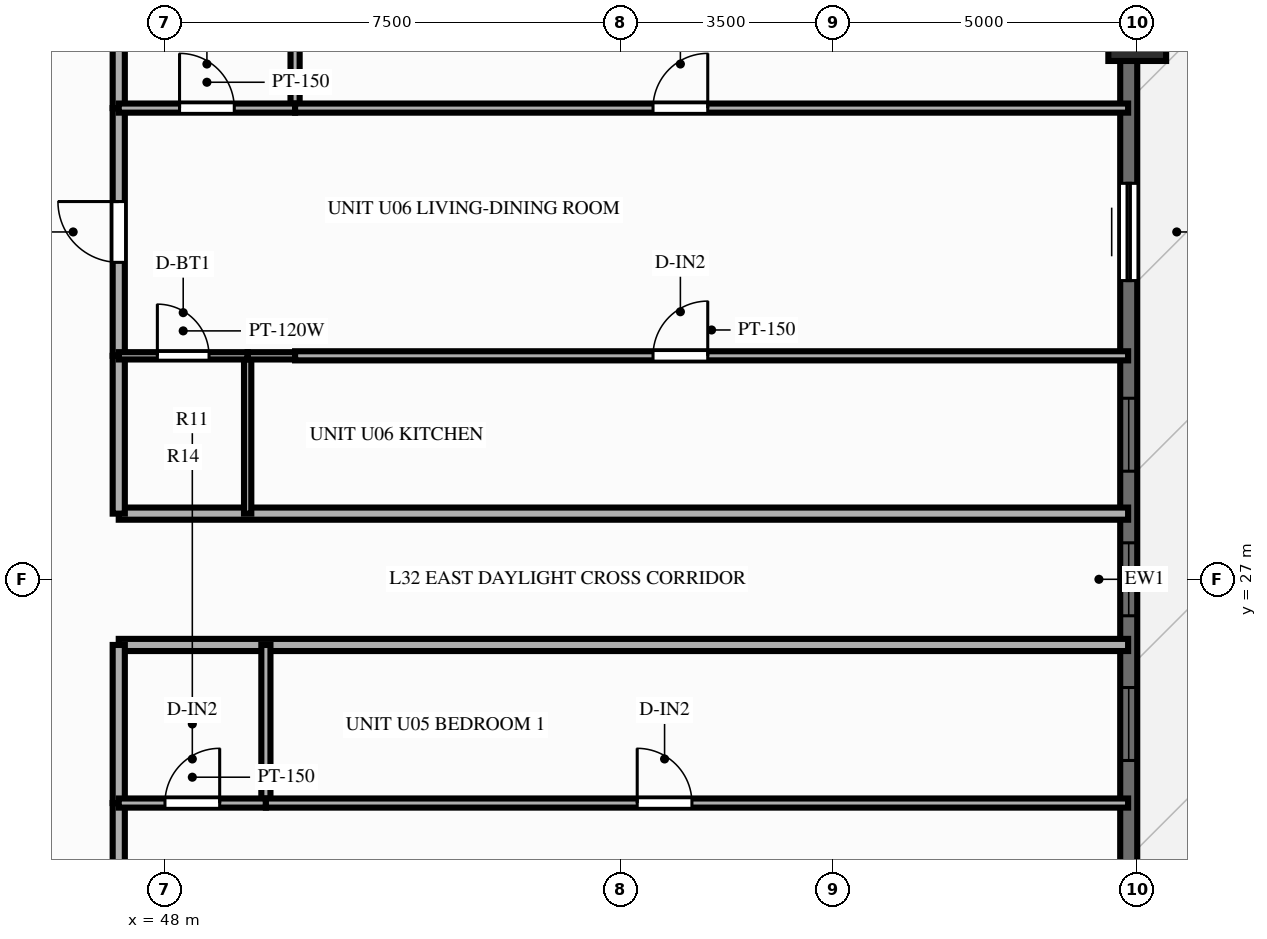
"""IFC4 building model, lengths in metres.
Left out: names, types, materials, properties, quantities, classifications, styles, units other than length and angle.
Written with IfcOpenShell. Run it as: python <this file> out.ifc"""

import sys

from ifc_helpers import new_model, si_unit, direction, frame, frame_2d, origin, origin_2d, place, context, subcontext, project, spatial, rectangle, extrude, source, transform, mapped, element, fill, save


model = new_model("IFC4")
c1 = context("Model", 3, precision=1e-05, world=origin(), true_north=direction((0.0, 1.0)))
c2 = subcontext(c1, "Body", "Model", "MODEL_VIEW")
j1 = project(units=[si_unit("LENGTHUNIT", "METRE"), si_unit("PLANEANGLEUNIT", "RADIAN")], contexts=[c1])
p1 = place(None, origin())
s1 = spatial("IfcSite", under=j1, at=p1, CompositionType="ELEMENT")
p2 = place(p1, origin())
s2 = spatial("IfcBuilding", under=s1, at=p2, CompositionType="ELEMENT")
p3 = place(p2, frame((0.0, 0.0, 101.85)))
s3 = spatial("IfcBuildingStorey", under=s2, at=p3, CompositionType="ELEMENT", Elevation=101.85)
m1 = source(origin(), c2, "Body", "SweptSolid", [
    extrude(rectangle(XDim=0.95, YDim=0.95, at=origin_2d()), origin(), (0.0, 0.0, 1.0), 3.0),
])
p4 = place(p3, frame((64.0, 36.0, 0.0), z_axis=(0.0, 0.0, 1.0), x_axis=(1.0, 0.0, 0.0)))
e1 = element("IfcColumn", 1, at=p4, inside=s3, PredefinedType="COLUMN", context=c2, shape_type="MappedRepresentation", body=[
    mapped(m1, transform((0.0, 0.0, 0.0), scale=1.0)),
])
p5 = place(p3, frame((63.86, 7.2, 0.0), z_axis=(0.0, 0.0, 1.0), x_axis=(0.0, 1.0, 0.0)))
e2 = element("IfcWall", 2, at=p5, inside=s3, PredefinedType="SOLIDWALL", context=c2, shape_type="SweptSolid", body=[
    extrude(rectangle(XDim=39.6, YDim=0.28, at=frame_2d((19.8, 0.0))), origin(), (0.0, 0.0, 1.0), 2.28),
])
p6 = place(p5, frame((0.945, 0.0, 0.25)))
e3 = element("IfcOpeningElement", 3, at=p6, cuts=e2, PredefinedType="OPENING", context=c2, shape_type="SweptSolid", body=[
    extrude(rectangle(XDim=1.2, YDim=1.5, at=frame_2d((0.6, 0.75))), frame((0.0, 0.152, 0.0), z_axis=(0.0, -1.0, 0.0), x_axis=(1.0, 0.0, 0.0)), (0.0, 0.0, 1.0), 0.304),
])
p7 = place(p5, frame((4.213, 0.0, 0.25)))
e4 = element("IfcOpeningElement", 4, at=p7, cuts=e2, PredefinedType="OPENING", context=c2, shape_type="SweptSolid", body=[
    extrude(rectangle(XDim=1.2, YDim=1.5, at=frame_2d((0.6, 0.75))), frame((0.0, 0.152, 0.0), z_axis=(0.0, -1.0, 0.0), x_axis=(1.0, 0.0, 0.0)), (0.0, 0.0, 1.0), 0.304),
])
p8 = place(p5, frame((7.55, 0.0, 0.25)))
e5 = element("IfcOpeningElement", 5, at=p8, cuts=e2, PredefinedType="OPENING", context=c2, shape_type="SweptSolid", body=[
    extrude(rectangle(XDim=1.2, YDim=1.5, at=frame_2d((0.6, 0.75))), frame((0.0, 0.152, 0.0), z_axis=(0.0, -1.0, 0.0), x_axis=(1.0, 0.0, 0.0)), (0.0, 0.0, 1.0), 0.304),
])
p9 = place(p5, frame((13.483, 0.0, 0.25)))
e6 = element("IfcOpeningElement", 6, at=p9, cuts=e2, PredefinedType="OPENING", context=c2, shape_type="SweptSolid", body=[
    extrude(rectangle(XDim=1.2, YDim=1.5, at=frame_2d((0.6, 0.75))), frame((0.0, 0.152, 0.0), z_axis=(0.0, -1.0, 0.0), x_axis=(1.0, 0.0, 0.0)), (0.0, 0.0, 1.0), 0.304),
])
p10 = place(p5, frame((16.82, 0.0, 0.25)))
e7 = element("IfcOpeningElement", 7, at=p10, cuts=e2, PredefinedType="OPENING", context=c2, shape_type="SweptSolid", body=[
    extrude(rectangle(XDim=1.2, YDim=1.5, at=frame_2d((0.6, 0.75))), frame((0.0, 0.152, 0.0), z_axis=(0.0, -1.0, 0.0), x_axis=(1.0, 0.0, 0.0)), (0.0, 0.0, 1.0), 0.304),
])
p11 = place(p5, frame((19.2, 0.0, 0.25)))
e8 = element("IfcOpeningElement", 8, at=p11, cuts=e2, PredefinedType="OPENING", context=c2, shape_type="SweptSolid", body=[
    extrude(rectangle(XDim=1.2, YDim=1.5, at=frame_2d((0.6, 0.75))), frame((0.0, 0.152, 0.0), z_axis=(0.0, -1.0, 0.0), x_axis=(1.0, 0.0, 0.0)), (0.0, 0.0, 1.0), 0.304),
])
p12 = place(p5, frame((21.578, 0.0, 0.25)))
e9 = element("IfcOpeningElement", 9, at=p12, cuts=e2, PredefinedType="OPENING", context=c2, shape_type="SweptSolid", body=[
    extrude(rectangle(XDim=1.2, YDim=1.5, at=frame_2d((0.6, 0.75))), frame((0.0, 0.152, 0.0), z_axis=(0.0, -1.0, 0.0), x_axis=(1.0, 0.0, 0.0)), (0.0, 0.0, 1.0), 0.304),
])
p13 = place(p5, frame((26.313, 0.0, 0.0), z_axis=(0.0, 0.0, 1.0), x_axis=(-1.0, 0.0, 0.0)))
e10 = element("IfcOpeningElement", 10, at=p13, cuts=e2, PredefinedType="OPENING", context=c2, shape_type="SweptSolid", body=[
    extrude(rectangle(XDim=1.6, YDim=2.15, at=frame_2d((0.8, 1.075))), frame((0.0, 0.152, 0.0), z_axis=(0.0, -1.0, 0.0), x_axis=(1.0, 0.0, 0.0)), (0.0, 0.0, 1.0), 0.304),
])
p14 = place(p5, frame((29.305, 0.0, 0.25)))
e11 = element("IfcOpeningElement", 11, at=p14, cuts=e2, PredefinedType="OPENING", context=c2, shape_type="SweptSolid", body=[
    extrude(rectangle(XDim=0.7, YDim=1.5, at=frame_2d((0.35, 0.75))), frame((0.0, 0.152, 0.0), z_axis=(0.0, -1.0, 0.0), x_axis=(1.0, 0.0, 0.0)), (0.0, 0.0, 1.0), 0.304),
])
p15 = place(p5, frame((30.848, 0.0, 0.25)))
e12 = element("IfcOpeningElement", 12, at=p15, cuts=e2, PredefinedType="OPENING", context=c2, shape_type="SweptSolid", body=[
    extrude(rectangle(XDim=1.2, YDim=1.5, at=frame_2d((0.6, 0.75))), frame((0.0, 0.152, 0.0), z_axis=(0.0, -1.0, 0.0), x_axis=(1.0, 0.0, 0.0)), (0.0, 0.0, 1.0), 0.304),
])
p16 = place(p5, frame((34.183, 0.0, 0.25)))
e13 = element("IfcOpeningElement", 13, at=p16, cuts=e2, PredefinedType="OPENING", context=c2, shape_type="SweptSolid", body=[
    extrude(rectangle(XDim=1.2, YDim=1.5, at=frame_2d((0.6, 0.75))), frame((0.0, 0.152, 0.0), z_axis=(0.0, -1.0, 0.0), x_axis=(1.0, 0.0, 0.0)), (0.0, 0.0, 1.0), 0.304),
])
p17 = place(p5, frame((37.452, 0.0, 0.25)))
e14 = element("IfcOpeningElement", 14, at=p17, cuts=e2, PredefinedType="OPENING", context=c2, shape_type="SweptSolid", body=[
    extrude(rectangle(XDim=1.2, YDim=1.5, at=frame_2d((0.6, 0.75))), frame((0.0, 0.152, 0.0), z_axis=(0.0, -1.0, 0.0), x_axis=(1.0, 0.0, 0.0)), (0.0, 0.0, 1.0), 0.304),
])
p18 = place(p3, frame((47.25, 25.92, 0.0), z_axis=(0.0, 0.0, 1.0), x_axis=(1.0, 0.0, 0.0)))
e15 = element("IfcWall", 15, at=p18, inside=s3, PredefinedType="PARTITIONING", context=c2, shape_type="SweptSolid", body=[
    extrude(rectangle(XDim=16.6, YDim=0.2, at=frame_2d((8.3, 0.0))), origin(), (0.0, 0.0, 1.0), 2.79),
])
p19 = place(p3, frame((47.25, 19.246, 0.0), z_axis=(0.0, 0.0, 1.0), x_axis=(0.0, 1.0, 0.0)))
e16 = element("IfcWall", 16, at=p19, inside=s3, PredefinedType="PARTITIONING", context=c2, shape_type="SweptSolid", body=[
    extrude(rectangle(XDim=4.074, YDim=0.2, at=frame_2d((2.037, 0.0))), origin(), (0.0, 0.0, 1.0), 2.79),
])
p20 = place(p19, frame((1.537, 0.0, 0.0)))
e17 = element("IfcOpeningElement", 17, at=p20, cuts=e16, PredefinedType="OPENING", context=c2, shape_type="SweptSolid", body=[
    extrude(rectangle(XDim=1.0, YDim=2.15, at=frame_2d((0.5, 1.075))), frame((0.0, 0.112, 0.0), z_axis=(0.0, -1.0, 0.0), x_axis=(1.0, 0.0, 0.0)), (0.0, 0.0, 1.0), 0.224),
])
p21 = place(p3, frame((47.25, 23.32, 0.0), z_axis=(0.0, 0.0, 1.0), x_axis=(0.0, 1.0, 0.0)))
e18 = element("IfcWall", 18, at=p21, inside=s3, PredefinedType="PARTITIONING", context=c2, shape_type="SweptSolid", body=[
    extrude(rectangle(XDim=2.6, YDim=0.2, at=frame_2d((1.3, 0.0))), origin(), (0.0, 0.0, 1.0), 2.79),
])
p22 = place(p3, frame((49.67, 23.32, 0.0), z_axis=(0.0, 0.0, 1.0), x_axis=(0.0, 1.0, 0.0)))
e19 = element("IfcWall", 19, at=p22, inside=s3, PredefinedType="PARTITIONING", context=c2, shape_type="SweptSolid", body=[
    extrude(rectangle(XDim=2.6, YDim=0.15, at=frame_2d((1.3, 0.0))), origin(), (0.0, 0.0, 1.0), 2.79),
])
p23 = place(p3, frame((47.25, 23.32, 0.0), z_axis=(0.0, 0.0, 1.0), x_axis=(1.0, 0.0, 0.0)))
e20 = element("IfcWall", 20, at=p23, inside=s3, PredefinedType="PARTITIONING", context=c2, shape_type="SweptSolid", body=[
    extrude(rectangle(XDim=2.42, YDim=0.15, at=frame_2d((1.21, 0.0))), origin(), (0.0, 0.0, 1.0), 2.79),
])
p24 = place(p23, frame((0.76, 0.0, 0.0)))
e21 = element("IfcOpeningElement", 21, at=p24, cuts=e20, PredefinedType="OPENING", context=c2, shape_type="SweptSolid", body=[
    extrude(rectangle(XDim=0.9, YDim=2.1, at=frame_2d((0.45, 1.05))), frame((0.0, 0.087, 0.0), z_axis=(0.0, -1.0, 0.0), x_axis=(1.0, 0.0, 0.0)), (0.0, 0.0, 1.0), 0.174),
])
p25 = place(p3, frame((49.67, 23.32, 0.0), z_axis=(0.0, 0.0, 1.0), x_axis=(1.0, 0.0, 0.0)))
e22 = element("IfcWall", 22, at=p25, inside=s3, PredefinedType="PARTITIONING", context=c2, shape_type="SweptSolid", body=[
    extrude(rectangle(XDim=14.18, YDim=0.15, at=frame_2d((7.09, 0.0))), origin(), (0.0, 0.0, 1.0), 2.79),
])
p26 = place(p25, frame((6.107, 0.0, 0.0)))
e23 = element("IfcOpeningElement", 23, at=p26, cuts=e22, PredefinedType="OPENING", context=c2, shape_type="SweptSolid", body=[
    extrude(rectangle(XDim=0.9, YDim=2.1, at=frame_2d((0.45, 1.05))), frame((0.0, 0.087, 0.0), z_axis=(0.0, -1.0, 0.0), x_axis=(1.0, 0.0, 0.0)), (0.0, 0.0, 1.0), 0.174),
])
p27 = place(p3, frame((47.25, 28.08, 0.0), z_axis=(0.0, 0.0, 1.0), x_axis=(1.0, 0.0, 0.0)))
e24 = element("IfcWall", 24, at=p27, inside=s3, PredefinedType="PARTITIONING", context=c2, shape_type="SweptSolid", body=[
    extrude(rectangle(XDim=16.6, YDim=0.2, at=frame_2d((8.3, 0.0))), origin(), (0.0, 0.0, 1.0), 2.79),
])
p28 = place(p3, frame((47.25, 28.08, 0.0), z_axis=(0.0, 0.0, 1.0), x_axis=(0.0, 1.0, 0.0)))
e25 = element("IfcWall", 25, at=p28, inside=s3, PredefinedType="PARTITIONING", context=c2, shape_type="SweptSolid", body=[
    extrude(rectangle(XDim=2.595, YDim=0.2, at=frame_2d((1.298, 0.0))), origin(), (0.0, 0.0, 1.0), 2.79),
])
p29 = place(p3, frame((47.25, 30.676, 0.0), z_axis=(0.0, 0.0, 1.0), x_axis=(0.0, 1.0, 0.0)))
e26 = element("IfcWall", 26, at=p29, inside=s3, PredefinedType="PARTITIONING", context=c2, shape_type="SweptSolid", body=[
    extrude(rectangle(XDim=4.074, YDim=0.2, at=frame_2d((2.037, 0.0))), origin(), (0.0, 0.0, 1.0), 2.79),
])
p30 = place(p29, frame((1.537, 0.0, 0.0)))
e27 = element("IfcOpeningElement", 27, at=p30, cuts=e26, PredefinedType="OPENING", context=c2, shape_type="SweptSolid", body=[
    extrude(rectangle(XDim=1.0, YDim=2.15, at=frame_2d((0.5, 1.075))), frame((0.0, 0.112, 0.0), z_axis=(0.0, -1.0, 0.0), x_axis=(1.0, 0.0, 0.0)), (0.0, 0.0, 1.0), 0.224),
])
p31 = place(p3, frame((47.25, 34.75, 0.0), z_axis=(0.0, 0.0, 1.0), x_axis=(0.0, 1.0, 0.0)))
e28 = element("IfcWall", 28, at=p31, inside=s3, PredefinedType="PARTITIONING", context=c2, shape_type="SweptSolid", body=[
    extrude(rectangle(XDim=2.6, YDim=0.2, at=frame_2d((1.3, 0.0))), origin(), (0.0, 0.0, 1.0), 2.79),
])
p32 = place(p3, frame((49.37, 28.08, 0.0), z_axis=(0.0, 0.0, 1.0), x_axis=(0.0, 1.0, 0.0)))
e29 = element("IfcWall", 29, at=p32, inside=s3, PredefinedType="PARTITIONING", context=c2, shape_type="SweptSolid", body=[
    extrude(rectangle(XDim=2.595, YDim=0.12, at=frame_2d((1.298, 0.0))), origin(), (0.0, 0.0, 1.0), 2.79),
])
p33 = place(p3, frame((50.15, 34.75, 0.0), z_axis=(0.0, 0.0, 1.0), x_axis=(0.0, 1.0, 0.0)))
e30 = element("IfcWall", 30, at=p33, inside=s3, PredefinedType="PARTITIONING", context=c2, shape_type="SweptSolid", body=[
    extrude(rectangle(XDim=2.6, YDim=0.15, at=frame_2d((1.3, 0.0))), origin(), (0.0, 0.0, 1.0), 2.79),
])
p34 = place(p3, frame((47.25, 30.676, 0.0), z_axis=(0.0, 0.0, 1.0), x_axis=(1.0, 0.0, 0.0)))
e31 = element("IfcWall", 31, at=p34, inside=s3, PredefinedType="PARTITIONING", context=c2, shape_type="SweptSolid", body=[
    extrude(rectangle(XDim=2.12, YDim=0.12, at=frame_2d((1.06, 0.0))), origin(), (0.0, 0.0, 1.0), 2.79),
])
p35 = place(p34, frame((0.635, 0.0, 0.0)))
e32 = element("IfcOpeningElement", 32, at=p35, cuts=e31, PredefinedType="OPENING", context=c2, shape_type="SweptSolid", body=[
    extrude(rectangle(XDim=0.85, YDim=2.05, at=frame_2d((0.425, 1.025))), frame((0.0, 0.072, 0.0), z_axis=(0.0, -1.0, 0.0), x_axis=(1.0, 0.0, 0.0)), (0.0, 0.0, 1.0), 0.144),
])
p36 = place(p3, frame((49.37, 30.676, 0.0), z_axis=(0.0, 0.0, 1.0), x_axis=(1.0, 0.0, 0.0)))
e33 = element("IfcWall", 33, at=p36, inside=s3, PredefinedType="PARTITIONING", context=c2, shape_type="SweptSolid", body=[
    extrude(rectangle(XDim=0.78, YDim=0.12, at=frame_2d((0.39, 0.0))), origin(), (0.0, 0.0, 1.0), 2.79),
])
p37 = place(p3, frame((50.15, 30.676, 0.0), z_axis=(0.0, 0.0, 1.0), x_axis=(1.0, 0.0, 0.0)))
e34 = element("IfcWall", 34, at=p37, inside=s3, PredefinedType="PARTITIONING", context=c2, shape_type="SweptSolid", body=[
    extrude(rectangle(XDim=13.7, YDim=0.15, at=frame_2d((6.85, 0.0))), origin(), (0.0, 0.0, 1.0), 2.79),
])
p38 = place(p37, frame((5.887, 0.0, 0.0)))
e35 = element("IfcOpeningElement", 35, at=p38, cuts=e34, PredefinedType="OPENING", context=c2, shape_type="SweptSolid", body=[
    extrude(rectangle(XDim=0.9, YDim=2.1, at=frame_2d((0.45, 1.05))), frame((0.0, 0.087, 0.0), z_axis=(0.0, -1.0, 0.0), x_axis=(1.0, 0.0, 0.0)), (0.0, 0.0, 1.0), 0.174),
])
p39 = place(p3, frame((47.25, 34.75, 0.0), z_axis=(0.0, 0.0, 1.0), x_axis=(1.0, 0.0, 0.0)))
e36 = element("IfcWall", 36, at=p39, inside=s3, PredefinedType="PARTITIONING", context=c2, shape_type="SweptSolid", body=[
    extrude(rectangle(XDim=2.9, YDim=0.15, at=frame_2d((1.45, 0.0))), origin(), (0.0, 0.0, 1.0), 2.79),
])
p40 = place(p39, frame((1.0, 0.0, 0.0)))
e37 = element("IfcOpeningElement", 37, at=p40, cuts=e36, PredefinedType="OPENING", context=c2, shape_type="SweptSolid", body=[
    extrude(rectangle(XDim=0.9, YDim=2.1, at=frame_2d((0.45, 1.05))), frame((0.0, 0.087, 0.0), z_axis=(0.0, -1.0, 0.0), x_axis=(1.0, 0.0, 0.0)), (0.0, 0.0, 1.0), 0.174),
])
p41 = place(p3, frame((50.15, 34.75, 0.0), z_axis=(0.0, 0.0, 1.0), x_axis=(1.0, 0.0, 0.0)))
e38 = element("IfcWall", 38, at=p41, inside=s3, PredefinedType="PARTITIONING", context=c2, shape_type="SweptSolid", body=[
    extrude(rectangle(XDim=13.7, YDim=0.15, at=frame_2d((6.85, 0.0))), origin(), (0.0, 0.0, 1.0), 2.79),
])
p42 = place(p41, frame((5.887, 0.0, 0.0)))
e39 = element("IfcOpeningElement", 39, at=p42, cuts=e38, PredefinedType="OPENING", context=c2, shape_type="SweptSolid", body=[
    extrude(rectangle(XDim=0.9, YDim=2.1, at=frame_2d((0.45, 1.05))), frame((0.0, 0.087, 0.0), z_axis=(0.0, -1.0, 0.0), x_axis=(1.0, 0.0, 0.0)), (0.0, 0.0, 1.0), 0.174),
])
m2 = source(origin(), c2, "Body", "SweptSolid", [
    extrude(rectangle(XDim=1.2, YDim=1.5, at=frame_2d((0.6, 0.75))), frame((0.0, 0.03, 0.0), z_axis=(0.0, -1.0, 0.0), x_axis=(1.0, 0.0, 0.0)), (0.0, 0.0, 1.0), 0.06),
])
p43 = place(p10, origin())
e40 = element("IfcWindow", 40, at=p43, inside=s3, PartitioningType="SINGLE_PANEL", PredefinedType="WINDOW", context=c2, shape_type="MappedRepresentation", body=[
    mapped(m2, transform((0.0, 0.0, 0.0), scale=1.0)),
])
fill(e7, e40)
p44 = place(p11, origin())
e41 = element("IfcWindow", 41, at=p44, inside=s3, PartitioningType="SINGLE_PANEL", PredefinedType="WINDOW", context=c2, shape_type="MappedRepresentation", body=[
    mapped(m2, transform((0.0, 0.0, 0.0), scale=1.0)),
])
fill(e8, e41)
p45 = place(p12, origin())
e42 = element("IfcWindow", 42, at=p45, inside=s3, PartitioningType="SINGLE_PANEL", PredefinedType="WINDOW", context=c2, shape_type="MappedRepresentation", body=[
    mapped(m2, transform((0.0, 0.0, 0.0), scale=1.0)),
])
fill(e9, e42)
m3 = source(origin(), c2, "Body", "SweptSolid", [
    extrude(rectangle(XDim=1.6, YDim=2.15, at=frame_2d((0.8, 1.075))), frame((0.0, 0.025, 0.0), z_axis=(0.0, -1.0, 0.0), x_axis=(1.0, 0.0, 0.0)), (0.0, 0.0, 1.0), 0.05),
])
p46 = place(p13, origin())
e43 = element("IfcDoor", 43, at=p46, inside=s3, OperationType="SLIDING_TO_LEFT", PredefinedType="DOOR", context=c2, shape_type="MappedRepresentation", body=[
    mapped(m3, transform((0.0, 0.0, 0.0), scale=1.0)),
])
fill(e10, e43)
m4 = source(origin(), c2, "Body", "SweptSolid", [
    extrude(rectangle(XDim=0.9, YDim=2.1, at=frame_2d((0.45, 1.05))), frame((0.0, 0.025, 0.0), z_axis=(0.0, -1.0, 0.0), x_axis=(1.0, 0.0, 0.0)), (0.0, 0.0, 1.0), 0.05),
])
p47 = place(p24, origin())
e44 = element("IfcDoor", 44, at=p47, inside=s3, OperationType="SINGLE_SWING_RIGHT", PredefinedType="DOOR", context=c2, shape_type="MappedRepresentation", body=[
    mapped(m4, transform((0.0, 0.0, 0.0), scale=1.0)),
])
fill(e21, e44)
p48 = place(p26, origin())
e45 = element("IfcDoor", 45, at=p48, inside=s3, OperationType="SINGLE_SWING_LEFT", PredefinedType="DOOR", context=c2, shape_type="MappedRepresentation", body=[
    mapped(m4, transform((0.0, 0.0, 0.0), scale=1.0)),
])
fill(e23, e45)
m5 = source(origin(), c2, "Body", "SweptSolid", [
    extrude(rectangle(XDim=1.0, YDim=2.15, at=frame_2d((0.5, 1.075))), frame((0.0, 0.025, 0.0), z_axis=(0.0, -1.0, 0.0), x_axis=(1.0, 0.0, 0.0)), (0.0, 0.0, 1.0), 0.05),
])
p49 = place(p30, origin())
e46 = element("IfcDoor", 46, at=p49, inside=s3, OperationType="SINGLE_SWING_RIGHT", PredefinedType="DOOR", context=c2, shape_type="MappedRepresentation", body=[
    mapped(m5, transform((0.0, 0.0, 0.0), scale=1.0)),
])
fill(e27, e46)
m6 = source(origin(), c2, "Body", "SweptSolid", [
    extrude(rectangle(XDim=0.85, YDim=2.05, at=frame_2d((0.425, 1.025))), frame((0.0, 0.025, 0.0), z_axis=(0.0, -1.0, 0.0), x_axis=(1.0, 0.0, 0.0)), (0.0, 0.0, 1.0), 0.05),
])
p50 = place(p35, origin())
e47 = element("IfcDoor", 47, at=p50, inside=s3, OperationType="SINGLE_SWING_LEFT", PredefinedType="DOOR", context=c2, shape_type="MappedRepresentation", body=[
    mapped(m6, transform((0.0, 0.0, 0.0), scale=1.0)),
])
fill(e32, e47)
p51 = place(p38, origin())
e48 = element("IfcDoor", 48, at=p51, inside=s3, OperationType="SINGLE_SWING_RIGHT", PredefinedType="DOOR", context=c2, shape_type="MappedRepresentation", body=[
    mapped(m4, transform((0.0, 0.0, 0.0), scale=1.0)),
])
fill(e35, e48)
p52 = place(p40, origin())
e49 = element("IfcDoor", 49, at=p52, inside=s3, OperationType="SINGLE_SWING_LEFT", PredefinedType="DOOR", context=c2, shape_type="MappedRepresentation", body=[
    mapped(m4, transform((0.0, 0.0, 0.0), scale=1.0)),
])
fill(e37, e49)
p53 = place(p42, origin())
e50 = element("IfcDoor", 50, at=p53, inside=s3, OperationType="SINGLE_SWING_RIGHT", PredefinedType="DOOR", context=c2, shape_type="MappedRepresentation", body=[
    mapped(m4, transform((0.0, 0.0, 0.0), scale=1.0)),
])
fill(e39, e50)
save(model, sys.argv[1])
